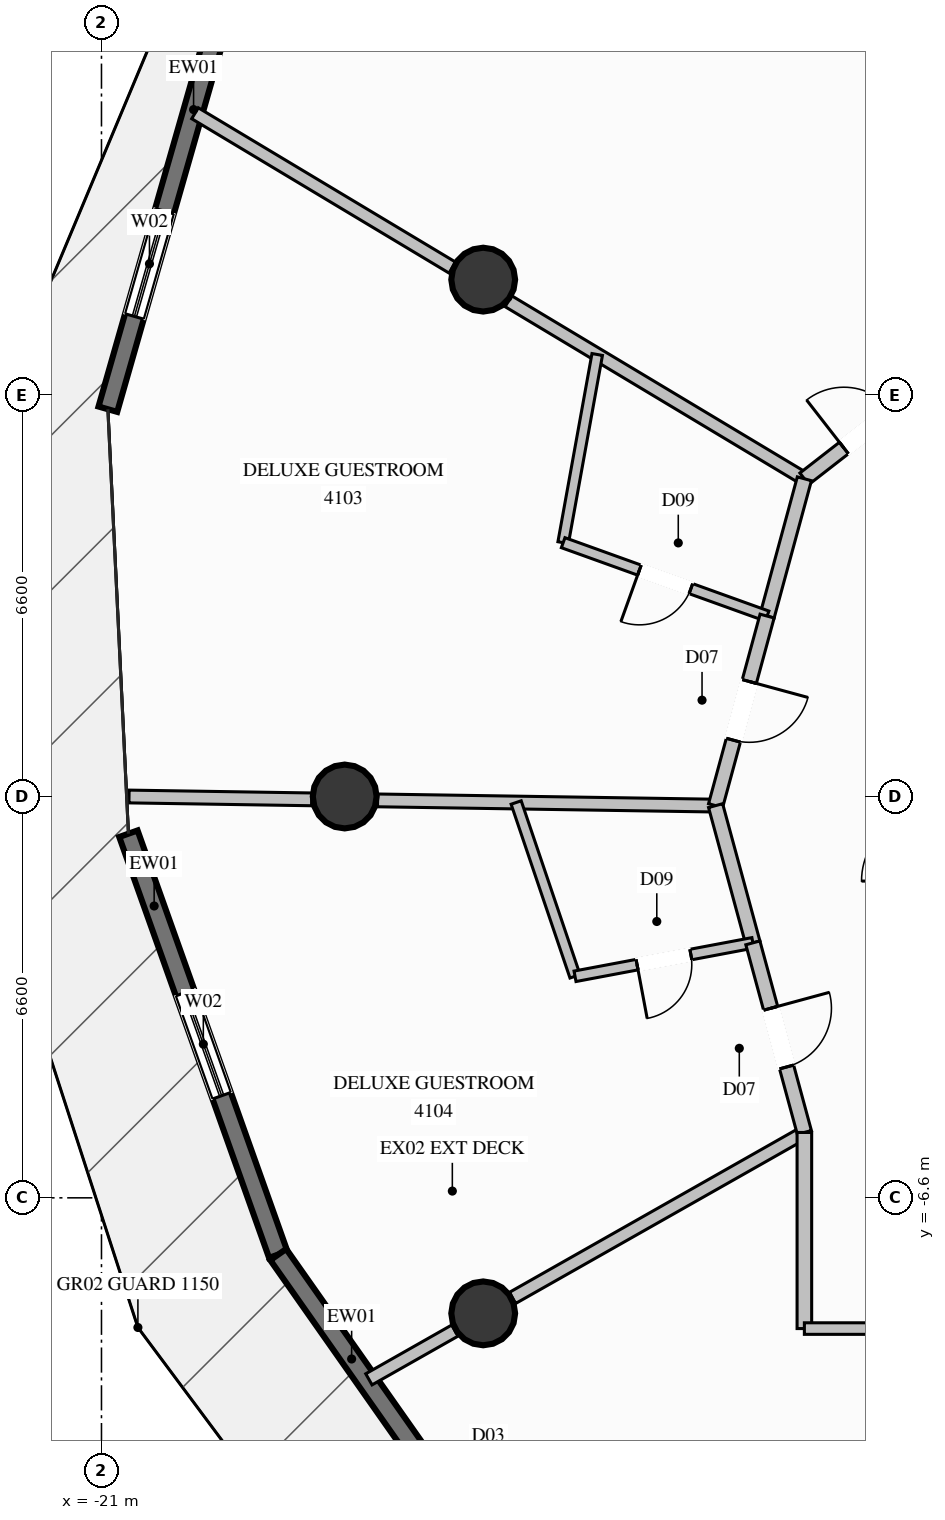
"""IFC4 building model, lengths in metres.
Left out: names, types, materials, properties, quantities, classifications, styles, units other than length and angle.
Written with IfcOpenShell. Run it as: python <this file> out.ifc"""

import sys

from ifc_helpers import new_model, si_unit, direction, frame, frame_2d, origin, origin_2d, place, context, subcontext, project, spatial, rectangle, circle, extrude, element, fill, save


model = new_model("IFC4")
c1 = context("Model", 3, precision=1e-05, world=origin(), true_north=direction((0.0, 1.0)))
c2 = subcontext(c1, "Body", "Model", "MODEL_VIEW")
j1 = project(units=[si_unit("LENGTHUNIT", "METRE"), si_unit("PLANEANGLEUNIT", "RADIAN")], contexts=[c1])
p1 = place(None, origin())
s1 = spatial("IfcSite", under=j1, at=p1, CompositionType="ELEMENT")
p2 = place(p1, origin())
s2 = spatial("IfcBuilding", under=s1, at=p2, CompositionType="ELEMENT")
p3 = place(p2, frame((0.0, 0.0, 153.0)))
s3 = spatial("IfcBuildingStorey", under=s2, at=p3, CompositionType="ELEMENT", Elevation=153.0)
for number, where, z_axis, x_axis in (
    (1, (-14.722, 8.5, 0.0), (0.0, 0.0, 1.0), (1.0, 0.0, 0.0)),
    (2, (-17.0, 0.0, 0.0), (0.0, 0.0, 1.0), (1.0, 0.0, 0.0)),
    (3, (-14.722, -8.5, 0.0), (0.0, 0.0, 1.0), (1.0, 0.0, 0.0)),
):
    element("IfcColumn", number, at=place(p3, frame(where, z_axis=z_axis, x_axis=x_axis)), inside=s3, PredefinedType="COLUMN", context=c2, shape_type="SweptSolid", body=[
        extrude(circle(Radius=0.525, at=origin_2d()), origin(), (0.0, 0.0, 1.0), 3.6),
    ])
p4 = place(p3, frame((-20.895, 6.369, 0.0), z_axis=(0.0, 0.0, 1.0), x_axis=(0.275067292431, 0.961424976082, 0.0)))
e4 = element("IfcWall", 4, at=p4, inside=s3, PredefinedType="SOLIDWALL", context=c2, shape_type="SweptSolid", body=[
    extrude(rectangle(XDim=6.613, YDim=0.32, at=frame_2d((3.307, 0.0))), origin(), (0.0, 0.0, 1.0), 3.35),
])
p5 = place(p4, frame((1.587, 0.0, 0.35)))
e5 = element("IfcOpeningElement", 5, at=p5, cuts=e4, PredefinedType="OPENING", context=c2, shape_type="SweptSolid", body=[
    extrude(rectangle(XDim=1.8, YDim=2.6, at=frame_2d((0.9, 1.3))), frame((0.0, 0.17, 0.0), z_axis=(0.0, -1.0, 0.0), x_axis=(1.0, 0.0, 0.0)), (0.0, 0.0, 1.0), 0.34),
])
p6 = place(p3, frame((-18.093, -7.533, 0.0), z_axis=(0.0, 0.0, 1.0), x_axis=(-0.335384656609, 0.942081276808, 0.0)))
e6 = element("IfcWall", 6, at=p6, inside=s3, PredefinedType="SOLIDWALL", context=c2, shape_type="SweptSolid", body=[
    extrude(rectangle(XDim=7.346, YDim=0.32, at=frame_2d((3.673, 0.0))), origin(), (0.0, 0.0, 1.0), 3.35),
])
p7 = place(p6, frame((2.773, 0.0, 0.35)))
e7 = element("IfcOpeningElement", 7, at=p7, cuts=e6, PredefinedType="OPENING", context=c2, shape_type="SweptSolid", body=[
    extrude(rectangle(XDim=1.8, YDim=2.6, at=frame_2d((0.9, 1.3))), frame((0.0, 0.17, 0.0), z_axis=(0.0, -1.0, 0.0), x_axis=(1.0, 0.0, 0.0)), (0.0, 0.0, 1.0), 0.34),
])
p8 = place(p3, frame((-13.746, -13.717, 0.0), z_axis=(0.0, 0.0, 1.0), x_axis=(-0.575065305211, 0.818107508059, 0.0)))
e8 = element("IfcWall", 8, at=p8, inside=s3, PredefinedType="SOLIDWALL", context=c2, shape_type="SweptSolid", body=[
    extrude(rectangle(XDim=7.559, YDim=0.32, at=frame_2d((3.78, 0.0))), origin(), (0.0, 0.0, 1.0), 3.35),
])
p9 = place(p8, frame((2.011, 0.0, 0.0)))
e9 = element("IfcOpeningElement", 9, at=p9, cuts=e8, PredefinedType="OPENING", context=c2, shape_type="SweptSolid", body=[
    extrude(rectangle(XDim=1.1, YDim=2.2, at=frame_2d((0.55, 1.1))), frame((0.0, 0.17, 0.0), z_axis=(0.0, -1.0, 0.0), x_axis=(1.0, 0.0, 0.0)), (0.0, 0.0, 1.0), 0.34),
])
p10 = place(p3, frame((-9.44, 5.225, 0.0), z_axis=(0.0, 0.0, 1.0), x_axis=(-0.857568811906, 0.514369257291, 0.0)))
e10 = element("IfcWall", 10, at=p10, inside=s3, PredefinedType="PARTITIONING", context=c2, shape_type="SweptSolid", body=[
    extrude(rectangle(XDim=5.677, YDim=0.21, at=frame_2d((2.838, 0.0))), origin(), (0.0, 0.0, 1.0), 2.791),
])
p11 = place(p3, frame((-15.23, 8.698, 0.0), z_axis=(0.0, 0.0, 1.0), x_axis=(-0.857588949281, 0.514335682285, 0.0)))
e11 = element("IfcWall", 11, at=p11, inside=s3, PredefinedType="PARTITIONING", context=c2, shape_type="SweptSolid", body=[
    extrude(rectangle(XDim=4.935, YDim=0.21, at=frame_2d((2.467, 0.0))), origin(), (0.0, 0.0, 1.0), 3.35),
])
p12 = place(p3, frame((-10.9, -0.15, 0.0), z_axis=(0.0, 0.0, 1.0), x_axis=(-0.999880532043, 0.01545709035, 0.0)))
e12 = element("IfcWall", 12, at=p12, inside=s3, PredefinedType="PARTITIONING", context=c2, shape_type="SweptSolid", body=[
    extrude(rectangle(XDim=5.56, YDim=0.21, at=frame_2d((2.78, 0.0))), origin(), (0.0, 0.0, 1.0), 3.35),
])
p13 = place(p3, frame((-17.543, -0.047, 0.0), z_axis=(0.0, 0.0, 1.0), x_axis=(-0.999877018081, 0.015682752092, 0.0)))
e13 = element("IfcWall", 13, at=p13, inside=s3, PredefinedType="PARTITIONING", context=c2, shape_type="SweptSolid", body=[
    extrude(rectangle(XDim=3.005, YDim=0.21, at=frame_2d((1.502, 0.0))), origin(), (0.0, 0.0, 1.0), 3.35),
])
p14 = place(p3, frame((-9.44, -5.525, 0.0), z_axis=(0.0, 0.0, 1.0), x_axis=(-0.86993170577, -0.493172208561, 0.0)))
e14 = element("IfcWall", 14, at=p14, inside=s3, PredefinedType="PARTITIONING", context=c2, shape_type="SweptSolid", body=[
    extrude(rectangle(XDim=5.518, YDim=0.21, at=frame_2d((2.759, 0.0))), origin(), (0.0, 0.0, 1.0), 2.791),
])
p15 = place(p3, frame((-15.188, -8.783, 0.0), z_axis=(0.0, 0.0, 1.0), x_axis=(-0.869837463866, -0.493338409669, 0.0)))
e15 = element("IfcWall", 15, at=p15, inside=s3, PredefinedType="PARTITIONING", context=c2, shape_type="SweptSolid", body=[
    extrude(rectangle(XDim=1.626, YDim=0.21, at=frame_2d((0.813, 0.0))), origin(), (0.0, 0.0, 1.0), 3.35),
])
p16 = place(p3, frame((-9.44, 5.225, 0.0), z_axis=(0.0, 0.0, 1.0), x_axis=(0.789431664708, 0.613838453306, 0.0)))
e16 = element("IfcWall", 16, at=p16, inside=s3, PredefinedType="PARTITIONING", context=c2, shape_type="SweptSolid", body=[
    extrude(rectangle(XDim=2.647, YDim=0.24, at=frame_2d((1.324, 0.0))), origin(), (0.0, 0.0, 1.0), 3.35),
])
p17 = place(p16, frame((0.824, 0.0, 0.0)))
e17 = element("IfcOpeningElement", 17, at=p17, cuts=e16, PredefinedType="OPENING", context=c2, shape_type="SweptSolid", body=[
    extrude(rectangle(XDim=1.0, YDim=2.2, at=frame_2d((0.5, 1.1))), frame((0.0, 0.13, 0.0), z_axis=(0.0, -1.0, 0.0), x_axis=(1.0, 0.0, 0.0)), (0.0, 0.0, 1.0), 0.26),
])
p18 = place(p3, frame((-9.44, 5.225, 0.0), z_axis=(0.0, 0.0, 1.0), x_axis=(-0.262004776073, -0.965066576623, 0.0)))
e18 = element("IfcWall", 18, at=p18, inside=s3, PredefinedType="PARTITIONING", context=c2, shape_type="SweptSolid", body=[
    extrude(rectangle(XDim=2.34, YDim=0.24, at=frame_2d((1.17, 0.0))), origin(), (0.0, 0.0, 1.0), 3.35),
])
p19 = place(p3, frame((-12.847, 7.269, 0.0), z_axis=(0.0, 0.0, 1.0), x_axis=(-0.178065684041, -0.984018603568, 0.0)))
e19 = element("IfcWall", 19, at=p19, inside=s3, PredefinedType="PLUMBINGWALL", context=c2, shape_type="SweptSolid", body=[
    extrude(rectangle(XDim=3.145, YDim=0.175, at=frame_2d((1.573, 0.0))), origin(), (0.0, 0.0, 1.0), 3.35),
])
p20 = place(p3, frame((-10.053, 2.967, 0.0), z_axis=(0.0, 0.0, 1.0), x_axis=(-0.940924076968, 0.338617603474, 0.0)))
e20 = element("IfcWall", 20, at=p20, inside=s3, PredefinedType="PLUMBINGWALL", context=c2, shape_type="SweptSolid", body=[
    extrude(rectangle(XDim=3.565, YDim=0.175, at=frame_2d((1.782, 0.0))), origin(), (0.0, 0.0, 1.0), 3.35),
])
p21 = place(p20, frame((1.332, 0.0, 0.0)))
e21 = element("IfcOpeningElement", 21, at=p21, cuts=e20, PredefinedType="OPENING", context=c2, shape_type="SweptSolid", body=[
    extrude(rectangle(XDim=0.9, YDim=2.1, at=frame_2d((0.45, 1.05))), frame((0.0, 0.098, 0.0), z_axis=(0.0, -1.0, 0.0), x_axis=(1.0, 0.0, 0.0)), (0.0, 0.0, 1.0), 0.195),
])
p22 = place(p3, frame((-10.053, 2.967, 0.0), z_axis=(0.0, 0.0, 1.0), x_axis=(-0.262209089996, -0.965011084456, 0.0)))
e22 = element("IfcWall", 22, at=p22, inside=s3, PredefinedType="PARTITIONING", context=c2, shape_type="SweptSolid", body=[
    extrude(rectangle(XDim=3.23, YDim=0.24, at=frame_2d((1.615, 0.0))), origin(), (0.0, 0.0, 1.0), 3.35),
])
p23 = place(p22, frame((1.115, 0.0, 0.0)))
e23 = element("IfcOpeningElement", 23, at=p23, cuts=e22, PredefinedType="OPENING", context=c2, shape_type="SweptSolid", body=[
    extrude(rectangle(XDim=1.0, YDim=2.2, at=frame_2d((0.5, 1.1))), frame((0.0, 0.13, 0.0), z_axis=(0.0, -1.0, 0.0), x_axis=(1.0, 0.0, 0.0)), (0.0, 0.0, 1.0), 0.26),
])
p24 = place(p3, frame((-10.9, -0.15, 0.0), z_axis=(0.0, 0.0, 1.0), x_axis=(0.262013132791, -0.965064307829, 0.0)))
e24 = element("IfcWall", 24, at=p24, inside=s3, PredefinedType="PARTITIONING", context=c2, shape_type="SweptSolid", body=[
    extrude(rectangle(XDim=2.339, YDim=0.24, at=frame_2d((1.169, 0.0))), origin(), (0.0, 0.0, 1.0), 3.35),
])
p25 = place(p3, frame((-14.18, -0.099, 0.0), z_axis=(0.0, 0.0, 1.0), x_axis=(0.320811716501, -0.947142989498, 0.0)))
e25 = element("IfcWall", 25, at=p25, inside=s3, PredefinedType="PLUMBINGWALL", context=c2, shape_type="SweptSolid", body=[
    extrude(rectangle(XDim=3.017, YDim=0.175, at=frame_2d((1.509, 0.0))), origin(), (0.0, 0.0, 1.0), 3.35),
])
p26 = place(p3, frame((-10.287, -2.407, 0.0), z_axis=(0.0, 0.0, 1.0), x_axis=(-0.982771742743, -0.184823433756, 0.0)))
e26 = element("IfcWall", 26, at=p26, inside=s3, PredefinedType="PLUMBINGWALL", context=c2, shape_type="SweptSolid", body=[
    extrude(rectangle(XDim=2.976, YDim=0.175, at=frame_2d((1.488, 0.0))), origin(), (0.0, 0.0, 1.0), 3.35),
])
p27 = place(p26, frame((1.038, 0.0, 0.0)))
e27 = element("IfcOpeningElement", 27, at=p27, cuts=e26, PredefinedType="OPENING", context=c2, shape_type="SweptSolid", body=[
    extrude(rectangle(XDim=0.9, YDim=2.1, at=frame_2d((0.45, 1.05))), frame((0.0, 0.098, 0.0), z_axis=(0.0, -1.0, 0.0), x_axis=(1.0, 0.0, 0.0)), (0.0, 0.0, 1.0), 0.195),
])
p28 = place(p3, frame((-10.287, -2.407, 0.0), z_axis=(0.0, 0.0, 1.0), x_axis=(0.262202977539, -0.965012745289, 0.0)))
e28 = element("IfcWall", 28, at=p28, inside=s3, PredefinedType="PARTITIONING", context=c2, shape_type="SweptSolid", body=[
    extrude(rectangle(XDim=3.231, YDim=0.24, at=frame_2d((1.615, 0.0))), origin(), (0.0, 0.0, 1.0), 3.35),
])
p29 = place(p28, frame((1.115, 0.0, 0.0)))
e29 = element("IfcOpeningElement", 29, at=p29, cuts=e28, PredefinedType="OPENING", context=c2, shape_type="SweptSolid", body=[
    extrude(rectangle(XDim=1.0, YDim=2.2, at=frame_2d((0.5, 1.1))), frame((0.0, 0.13, 0.0), z_axis=(0.0, -1.0, 0.0), x_axis=(1.0, 0.0, 0.0)), (0.0, 0.0, 1.0), 0.26),
])
p30 = place(p3, frame((-9.44, -5.525, 0.0), z_axis=(0.0, 0.0, 1.0), x_axis=(0.0, -1.0, 0.0)))
e30 = element("IfcWall", 30, at=p30, inside=s3, PredefinedType="PARTITIONING", context=c2, shape_type="SweptSolid", body=[
    extrude(rectangle(XDim=3.225, YDim=0.24, at=frame_2d((1.613, 0.0))), origin(), (0.0, 0.0, 1.0), 3.35),
])
p31 = place(p3, frame((-9.44, -8.75, 0.0), z_axis=(0.0, 0.0, 1.0), x_axis=(1.0, 0.0, 0.0)))
e31 = element("IfcWall", 31, at=p31, inside=s3, PredefinedType="PARTITIONING", context=c2, shape_type="SweptSolid", body=[
    extrude(rectangle(XDim=9.44, YDim=0.19, at=frame_2d((4.72, 0.0))), origin(), (0.0, 0.0, 1.0), 3.35),
])
p32 = place(p31, frame((4.245, 0.0, 0.0)))
e32 = element("IfcOpeningElement", 32, at=p32, cuts=e31, PredefinedType="OPENING", context=c2, shape_type="SweptSolid", body=[
    extrude(rectangle(XDim=0.95, YDim=2.1, at=frame_2d((0.475, 1.05))), frame((0.0, 0.105, 0.0), z_axis=(0.0, -1.0, 0.0), x_axis=(1.0, 0.0, 0.0)), (0.0, 0.0, 1.0), 0.21),
])
p33 = place(p5, origin())
e33 = element("IfcWindow", 33, at=p33, inside=s3, PartitioningType="SINGLE_PANEL", PredefinedType="WINDOW", context=c2, shape_type="SweptSolid", body=[
    extrude(rectangle(XDim=1.8, YDim=2.6, at=frame_2d((0.9, 1.3))), frame((0.0, 0.03, 0.0), z_axis=(0.0, -1.0, 0.0), x_axis=(1.0, 0.0, 0.0)), (0.0, 0.0, 1.0), 0.06),
])
fill(e5, e33)
p34 = place(p7, origin())
e34 = element("IfcWindow", 34, at=p34, inside=s3, PartitioningType="SINGLE_PANEL", PredefinedType="WINDOW", context=c2, shape_type="SweptSolid", body=[
    extrude(rectangle(XDim=1.8, YDim=2.6, at=frame_2d((0.9, 1.3))), frame((0.0, 0.03, 0.0), z_axis=(0.0, -1.0, 0.0), x_axis=(1.0, 0.0, 0.0)), (0.0, 0.0, 1.0), 0.06),
])
fill(e7, e34)
p35 = place(p17, origin())
e35 = element("IfcDoor", 35, at=p35, inside=s3, OperationType="SINGLE_SWING_LEFT", PredefinedType="DOOR", context=c2, shape_type="SweptSolid", body=[
    extrude(rectangle(XDim=1.0, YDim=2.2, at=frame_2d((0.5, 1.1))), frame((0.0, 0.025, 0.0), z_axis=(0.0, -1.0, 0.0), x_axis=(1.0, 0.0, 0.0)), (0.0, 0.0, 1.0), 0.05),
])
fill(e17, e35)
p36 = place(p21, origin())
e36 = element("IfcDoor", 36, at=p36, inside=s3, OperationType="SINGLE_SWING_RIGHT", PredefinedType="DOOR", context=c2, shape_type="SweptSolid", body=[
    extrude(rectangle(XDim=0.9, YDim=2.1, at=frame_2d((0.45, 1.05))), frame((0.0, 0.025, 0.0), z_axis=(0.0, -1.0, 0.0), x_axis=(1.0, 0.0, 0.0)), (0.0, 0.0, 1.0), 0.05),
])
fill(e21, e36)
p37 = place(p23, origin())
e37 = element("IfcDoor", 37, at=p37, inside=s3, OperationType="SINGLE_SWING_LEFT", PredefinedType="DOOR", context=c2, shape_type="SweptSolid", body=[
    extrude(rectangle(XDim=1.0, YDim=2.2, at=frame_2d((0.5, 1.1))), frame((0.0, 0.025, 0.0), z_axis=(0.0, -1.0, 0.0), x_axis=(1.0, 0.0, 0.0)), (0.0, 0.0, 1.0), 0.05),
])
fill(e23, e37)
p38 = place(p27, origin())
e38 = element("IfcDoor", 38, at=p38, inside=s3, OperationType="SINGLE_SWING_RIGHT", PredefinedType="DOOR", context=c2, shape_type="SweptSolid", body=[
    extrude(rectangle(XDim=0.9, YDim=2.1, at=frame_2d((0.45, 1.05))), frame((0.0, 0.025, 0.0), z_axis=(0.0, -1.0, 0.0), x_axis=(1.0, 0.0, 0.0)), (0.0, 0.0, 1.0), 0.05),
])
fill(e27, e38)
p39 = place(p29, origin())
e39 = element("IfcDoor", 39, at=p39, inside=s3, OperationType="SINGLE_SWING_LEFT", PredefinedType="DOOR", context=c2, shape_type="SweptSolid", body=[
    extrude(rectangle(XDim=1.0, YDim=2.2, at=frame_2d((0.5, 1.1))), frame((0.0, 0.025, 0.0), z_axis=(0.0, -1.0, 0.0), x_axis=(1.0, 0.0, 0.0)), (0.0, 0.0, 1.0), 0.05),
])
fill(e29, e39)
save(model, sys.argv[1])
